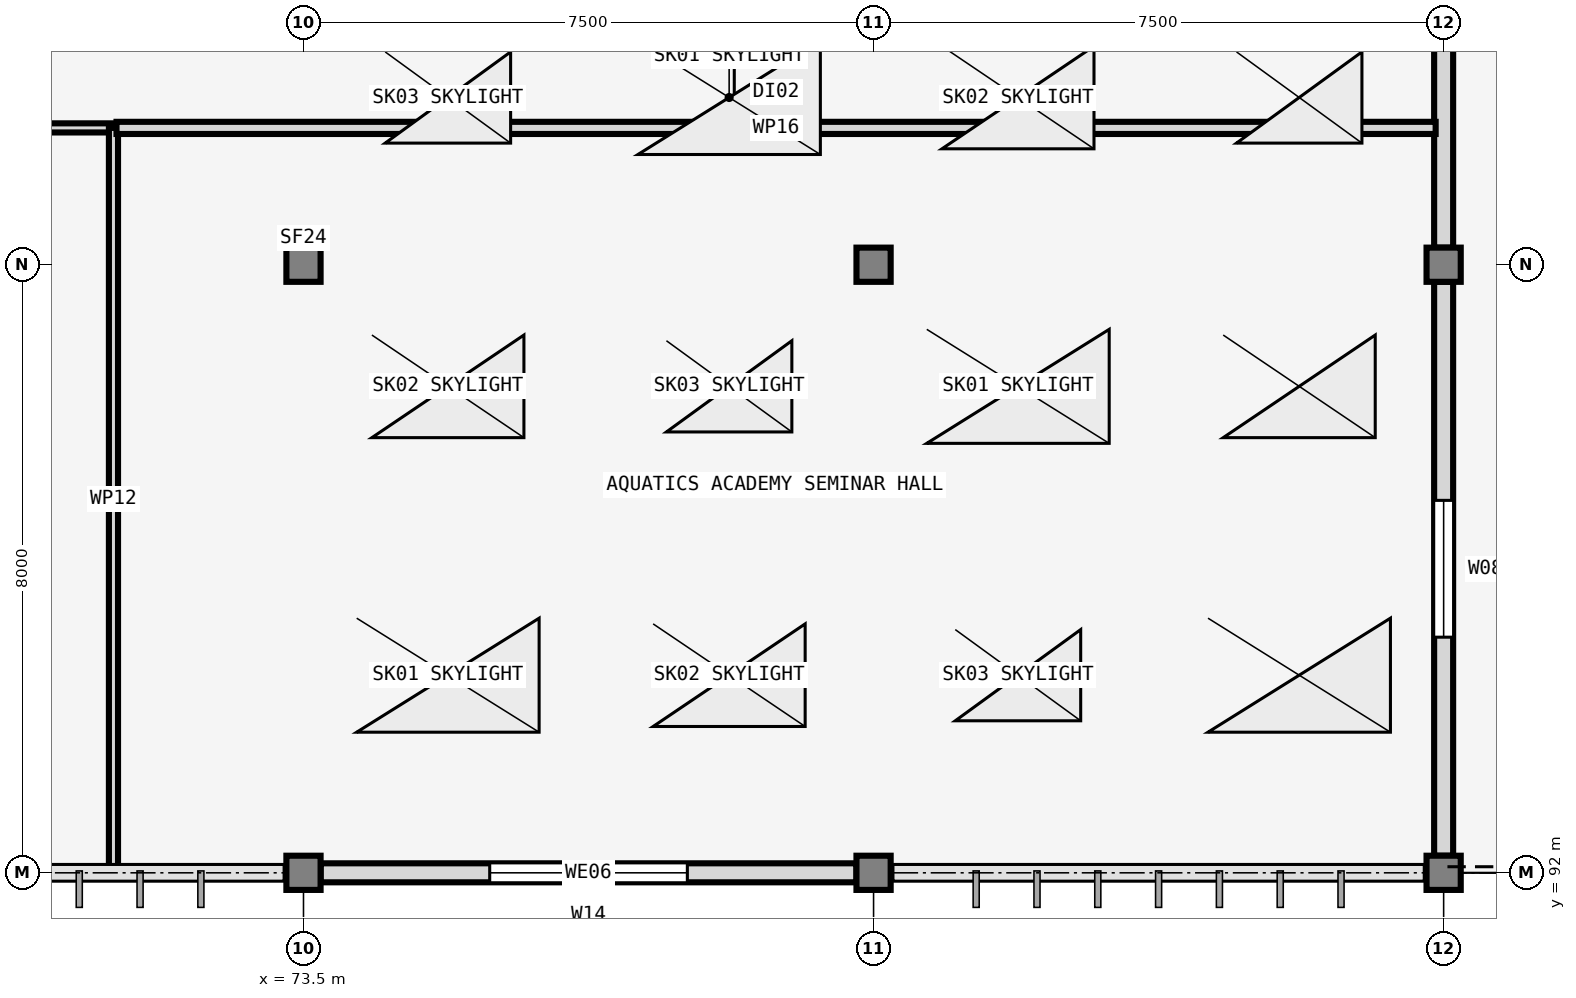
"""IFC4 building model, lengths in metres.
Left out: names, types, materials, properties, quantities, classifications, styles, units other than length and angle.
Written with IfcOpenShell. Run it as: python <this file> out.ifc"""

import sys

from ifc_helpers import new_model, si_unit, direction, frame, frame_2d, origin, origin_2d, place, context, subcontext, project, spatial, rectangle, extrude, element, fill, save


model = new_model("IFC4")
c1 = context("Model", 3, precision=1e-05, world=origin(), true_north=direction((0.0, 1.0)))
c2 = subcontext(c1, "Body", "Model", "MODEL_VIEW")
j1 = project(units=[si_unit("LENGTHUNIT", "METRE"), si_unit("PLANEANGLEUNIT", "RADIAN")], contexts=[c1])
p1 = place(None, origin())
s1 = spatial("IfcSite", under=j1, at=p1, CompositionType="ELEMENT")
p2 = place(p1, origin())
s2 = spatial("IfcBuilding", under=s1, at=p2, CompositionType="ELEMENT")
p3 = place(p2, frame((0.0, 0.0, 17.7)))
s3 = spatial("IfcBuildingStorey", under=s2, at=p3, CompositionType="ELEMENT", Elevation=17.7)
for number, where, z_axis, x_axis in (
    (1, (73.5, 92.0, 0.0), (0.0, 0.0, 1.0), (1.0, 0.0, 0.0)),
    (2, (73.5, 100.0, 0.0), (0.0, 0.0, 1.0), (1.0, 0.0, 0.0)),
    (3, (81.0, 92.0, 0.0), (0.0, 0.0, 1.0), (1.0, 0.0, 0.0)),
    (4, (81.0, 100.0, 0.0), (0.0, 0.0, 1.0), (1.0, 0.0, 0.0)),
    (5, (88.5, 92.0, 0.0), (0.0, 0.0, 1.0), (1.0, 0.0, 0.0)),
    (6, (88.5, 100.0, 0.0), (0.0, 0.0, 1.0), (1.0, 0.0, 0.0)),
):
    element("IfcColumn", number, at=place(p3, frame(where, z_axis=z_axis, x_axis=x_axis)), inside=s3, PredefinedType="COLUMN", context=c2, shape_type="SweptSolid", body=[
        extrude(rectangle(XDim=0.45, YDim=0.45, at=origin_2d()), origin(), (0.0, 0.0, 1.0), 3.96),
    ])
p4 = place(p3, frame((73.725, 92.0, 0.0), z_axis=(0.0, 0.0, 1.0), x_axis=(1.0, 0.0, 0.0)))
e7 = element("IfcWall", 7, at=p4, inside=s3, PredefinedType="SOLIDWALL", context=c2, shape_type="SweptSolid", body=[
    extrude(rectangle(XDim=7.05, YDim=0.25, at=frame_2d((3.525, 0.0))), origin(), (0.0, 0.0, 1.0), 3.67),
])
p5 = place(p4, frame((2.225, 0.0, 0.95)))
e8 = element("IfcOpeningElement", 8, at=p5, cuts=e7, PredefinedType="OPENING", context=c2, shape_type="SweptSolid", body=[
    extrude(rectangle(XDim=2.6, YDim=1.75, at=frame_2d((1.3, 0.875))), frame((0.0, 0.135, 0.0), z_axis=(0.0, -1.0, 0.0), x_axis=(1.0, 0.0, 0.0)), (0.0, 0.0, 1.0), 0.27),
])
p6 = place(p3, frame((88.5, 92.225, 0.0), z_axis=(0.0, 0.0, 1.0), x_axis=(0.0, 1.0, 0.0)))
e9 = element("IfcWall", 9, at=p6, inside=s3, PredefinedType="SOLIDWALL", context=c2, shape_type="SweptSolid", body=[
    extrude(rectangle(XDim=7.55, YDim=0.25, at=frame_2d((3.775, 0.0))), origin(), (0.0, 0.0, 1.0), 3.49),
])
p7 = place(p6, frame((2.875, 0.0, 0.95)))
e10 = element("IfcOpeningElement", 10, at=p7, cuts=e9, PredefinedType="OPENING", context=c2, shape_type="SweptSolid", body=[
    extrude(rectangle(XDim=1.8, YDim=1.5, at=frame_2d((0.9, 0.75))), frame((0.0, 0.135, 0.0), z_axis=(0.0, -1.0, 0.0), x_axis=(1.0, 0.0, 0.0)), (0.0, 0.0, 1.0), 0.27),
])
p8 = place(p3, frame((88.5, 100.225, 0.0), z_axis=(0.0, 0.0, 1.0), x_axis=(0.0, 1.0, 0.0)))
e11 = element("IfcWall", 11, at=p8, inside=s3, PredefinedType="SOLIDWALL", context=c2, shape_type="SweptSolid", body=[
    extrude(rectangle(XDim=7.55, YDim=0.25, at=frame_2d((3.775, 0.0))), origin(), (0.0, 0.0, 1.0), 3.49),
])
p9 = place(p8, frame((2.975, 0.0, 0.0)))
e12 = element("IfcOpeningElement", 12, at=p9, cuts=e11, PredefinedType="OPENING", context=c2, shape_type="SweptSolid", body=[
    extrude(rectangle(XDim=1.6, YDim=2.2, at=frame_2d((0.8, 1.1))), frame((0.0, 0.135, 0.0), z_axis=(0.0, -1.0, 0.0), x_axis=(1.0, 0.0, 0.0)), (0.0, 0.0, 1.0), 0.27),
])
p10 = place(p3, frame((51.06, 101.8, 0.0), z_axis=(0.0, 0.0, 1.0), x_axis=(1.0, 0.0, 0.0)))
e13 = element("IfcWall", 13, at=p10, inside=s3, PredefinedType="PARTITIONING", context=c2, shape_type="SweptSolid", body=[
    extrude(rectangle(XDim=19.94, YDim=0.12, at=frame_2d((9.97, 0.0))), origin(), (0.0, 0.0, 1.0), 3.15),
])
p11 = place(p10, frame((9.47, 0.0, 0.0)))
e14 = element("IfcOpeningElement", 14, at=p11, cuts=e13, PredefinedType="OPENING", context=c2, shape_type="SweptSolid", body=[
    extrude(rectangle(XDim=1.0, YDim=2.1, at=frame_2d((0.5, 1.05))), frame((0.0, 0.07, 0.0), z_axis=(0.0, -1.0, 0.0), x_axis=(1.0, 0.0, 0.0)), (0.0, 0.0, 1.0), 0.14),
])
p12 = place(p3, frame((71.0, 101.8, 0.0), z_axis=(0.0, 0.0, 1.0), x_axis=(0.0, -1.0, 0.0)))
e15 = element("IfcWall", 15, at=p12, inside=s3, PredefinedType="PARTITIONING", context=c2, shape_type="SweptSolid", body=[
    extrude(rectangle(XDim=9.752, YDim=0.12, at=frame_2d((4.876, 0.0))), origin(), (0.0, 0.0, 1.0), 3.15),
])
p13 = place(p3, frame((71.04, 101.8, 0.0), z_axis=(0.0, 0.0, 1.0), x_axis=(1.0, 0.0, 0.0)))
e16 = element("IfcWall", 16, at=p13, inside=s3, PredefinedType="PARTITIONING", context=c2, shape_type="SweptSolid", body=[
    extrude(rectangle(XDim=17.355, YDim=0.16, at=frame_2d((8.677, 0.0))), origin(), (0.0, 0.0, 1.0), 3.15),
])
p14 = place(p13, frame((8.127, 0.0, 0.0)))
e17 = element("IfcOpeningElement", 17, at=p14, cuts=e16, PredefinedType="OPENING", context=c2, shape_type="SweptSolid", body=[
    extrude(rectangle(XDim=1.1, YDim=2.1, at=frame_2d((0.55, 1.05))), frame((0.0, 0.09, 0.0), z_axis=(0.0, -1.0, 0.0), x_axis=(1.0, 0.0, 0.0)), (0.0, 0.0, 1.0), 0.18),
])
p15 = place(p5, origin())
e18 = element("IfcWindow", 18, at=p15, inside=s3, PartitioningType="SINGLE_PANEL", PredefinedType="WINDOW", context=c2, shape_type="SweptSolid", body=[
    extrude(rectangle(XDim=2.6, YDim=1.75, at=frame_2d((1.3, 0.875))), frame((0.0, 0.03, 0.0), z_axis=(0.0, -1.0, 0.0), x_axis=(1.0, 0.0, 0.0)), (0.0, 0.0, 1.0), 0.06),
])
fill(e8, e18)
p16 = place(p7, origin())
e19 = element("IfcWindow", 19, at=p16, inside=s3, PartitioningType="SINGLE_PANEL", PredefinedType="WINDOW", context=c2, shape_type="SweptSolid", body=[
    extrude(rectangle(XDim=1.8, YDim=1.5, at=frame_2d((0.9, 0.75))), frame((0.0, 0.03, 0.0), z_axis=(0.0, -1.0, 0.0), x_axis=(1.0, 0.0, 0.0)), (0.0, 0.0, 1.0), 0.06),
])
fill(e10, e19)
p17 = place(p2, frame((0.0, 0.0, 21.9)))
p18 = place(p17, frame((0.0, 0.0, -0.24)))
p19 = place(p18, frame((75.4, 94.6, 0.18)))
e20 = element("IfcWindow", 20, at=p19, inside=s3, PartitioningType="SINGLE_PANEL", PredefinedType="SKYLIGHT", context=c2, shape_type="SweptSolid", body=[
    extrude(rectangle(XDim=2.4, YDim=1.5, at=origin_2d()), origin(), (0.0, 0.0, 1.0), 0.05),
])
p20 = place(p18, frame((75.4, 98.4, 0.18)))
e21 = element("IfcWindow", 21, at=p20, inside=s3, PartitioningType="SINGLE_PANEL", PredefinedType="SKYLIGHT", context=c2, shape_type="SweptSolid", body=[
    extrude(rectangle(XDim=2.0, YDim=1.35, at=origin_2d()), origin(), (0.0, 0.0, 1.0), 0.05),
])
p21 = place(p18, frame((75.4, 102.2, 0.18)))
e22 = element("IfcWindow", 22, at=p21, inside=s3, PartitioningType="SINGLE_PANEL", PredefinedType="SKYLIGHT", context=c2, shape_type="SweptSolid", body=[
    extrude(rectangle(XDim=1.65, YDim=1.2, at=origin_2d()), origin(), (0.0, 0.0, 1.0), 0.05),
])
p22 = place(p18, frame((79.1, 94.6, 0.18)))
e23 = element("IfcWindow", 23, at=p22, inside=s3, PartitioningType="SINGLE_PANEL", PredefinedType="SKYLIGHT", context=c2, shape_type="SweptSolid", body=[
    extrude(rectangle(XDim=2.0, YDim=1.35, at=origin_2d()), origin(), (0.0, 0.0, 1.0), 0.05),
])
p23 = place(p18, frame((79.1, 98.4, 0.18)))
e24 = element("IfcWindow", 24, at=p23, inside=s3, PartitioningType="SINGLE_PANEL", PredefinedType="SKYLIGHT", context=c2, shape_type="SweptSolid", body=[
    extrude(rectangle(XDim=1.65, YDim=1.2, at=origin_2d()), origin(), (0.0, 0.0, 1.0), 0.05),
])
p24 = place(p18, frame((79.1, 102.2, 0.18)))
e25 = element("IfcWindow", 25, at=p24, inside=s3, PartitioningType="SINGLE_PANEL", PredefinedType="SKYLIGHT", context=c2, shape_type="SweptSolid", body=[
    extrude(rectangle(XDim=2.4, YDim=1.5, at=origin_2d()), origin(), (0.0, 0.0, 1.0), 0.05),
])
p25 = place(p18, frame((82.9, 94.6, 0.18)))
e26 = element("IfcWindow", 26, at=p25, inside=s3, PartitioningType="SINGLE_PANEL", PredefinedType="SKYLIGHT", context=c2, shape_type="SweptSolid", body=[
    extrude(rectangle(XDim=1.65, YDim=1.2, at=origin_2d()), origin(), (0.0, 0.0, 1.0), 0.05),
])
p26 = place(p18, frame((82.9, 98.4, 0.18)))
e27 = element("IfcWindow", 27, at=p26, inside=s3, PartitioningType="SINGLE_PANEL", PredefinedType="SKYLIGHT", context=c2, shape_type="SweptSolid", body=[
    extrude(rectangle(XDim=2.4, YDim=1.5, at=origin_2d()), origin(), (0.0, 0.0, 1.0), 0.05),
])
p27 = place(p18, frame((82.9, 102.2, 0.18)))
e28 = element("IfcWindow", 28, at=p27, inside=s3, PartitioningType="SINGLE_PANEL", PredefinedType="SKYLIGHT", context=c2, shape_type="SweptSolid", body=[
    extrude(rectangle(XDim=2.0, YDim=1.35, at=origin_2d()), origin(), (0.0, 0.0, 1.0), 0.05),
])
p28 = place(p18, frame((86.6, 94.6, 0.18)))
e29 = element("IfcWindow", 29, at=p28, inside=s3, PartitioningType="SINGLE_PANEL", PredefinedType="SKYLIGHT", context=c2, shape_type="SweptSolid", body=[
    extrude(rectangle(XDim=2.4, YDim=1.5, at=origin_2d()), origin(), (0.0, 0.0, 1.0), 0.05),
])
p29 = place(p18, frame((86.6, 98.4, 0.18)))
e30 = element("IfcWindow", 30, at=p29, inside=s3, PartitioningType="SINGLE_PANEL", PredefinedType="SKYLIGHT", context=c2, shape_type="SweptSolid", body=[
    extrude(rectangle(XDim=2.0, YDim=1.35, at=origin_2d()), origin(), (0.0, 0.0, 1.0), 0.05),
])
p30 = place(p18, frame((86.6, 102.2, 0.18)))
e31 = element("IfcWindow", 31, at=p30, inside=s3, PartitioningType="SINGLE_PANEL", PredefinedType="SKYLIGHT", context=c2, shape_type="SweptSolid", body=[
    extrude(rectangle(XDim=1.65, YDim=1.2, at=origin_2d()), origin(), (0.0, 0.0, 1.0), 0.05),
])
p31 = place(p14, origin())
e32 = element("IfcDoor", 32, at=p31, inside=s3, OperationType="SINGLE_SWING_LEFT", PredefinedType="DOOR", context=c2, shape_type="SweptSolid", body=[
    extrude(rectangle(XDim=1.1, YDim=2.1, at=frame_2d((0.55, 1.05))), frame((0.0, 0.025, 0.0), z_axis=(0.0, -1.0, 0.0), x_axis=(1.0, 0.0, 0.0)), (0.0, 0.0, 1.0), 0.05),
])
fill(e17, e32)
save(model, sys.argv[1])
